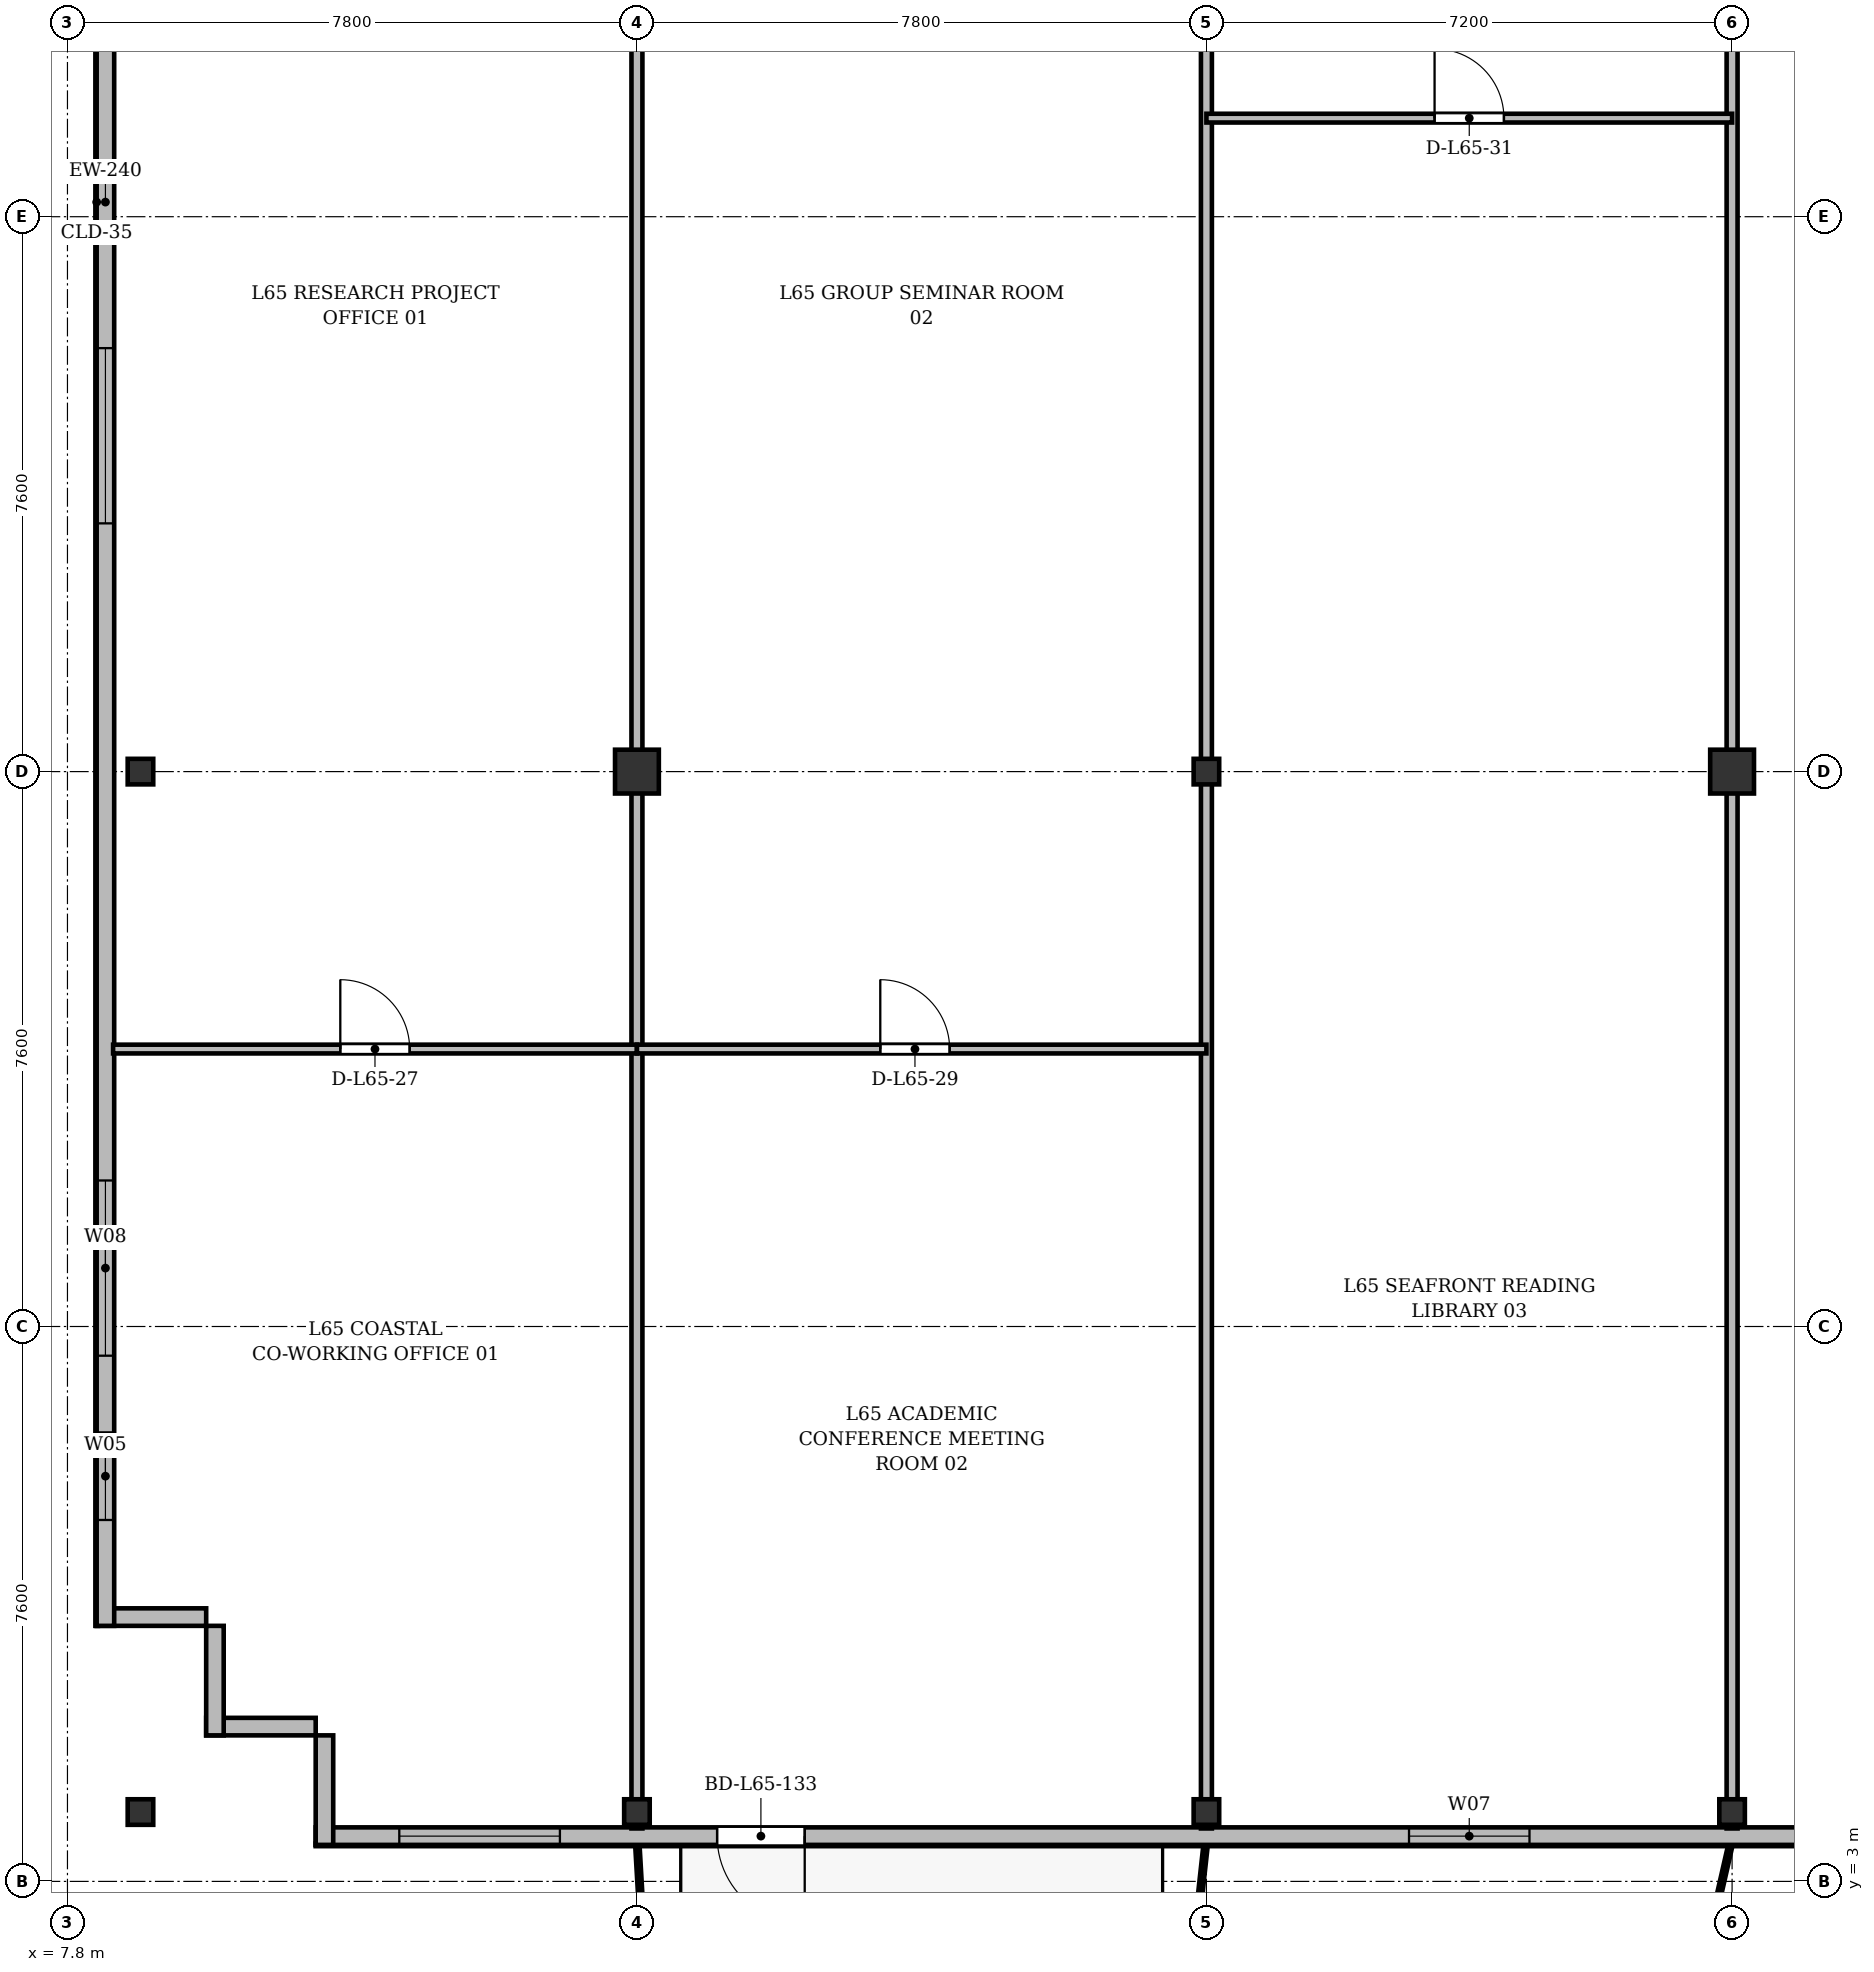
"""IFC4 building model, lengths in metres.
Left out: names, types, materials, properties, quantities, classifications, styles, units other than length and angle.
Written with IfcOpenShell. Run it as: python <this file> out.ifc"""

import sys

from ifc_helpers import new_model, si_unit, direction, frame, frame_2d, origin, origin_2d, place, context, subcontext, project, spatial, rectangle, i_section, extrude, source, transform, mapped, element, fill, save


model = new_model("IFC4")
c1 = context("Model", 3, precision=1e-05, world=origin(), true_north=direction((0.0, 1.0)))
c2 = subcontext(c1, "Body", "Model", "MODEL_VIEW")
j1 = project(units=[si_unit("LENGTHUNIT", "METRE"), si_unit("PLANEANGLEUNIT", "RADIAN")], contexts=[c1])
p1 = place(None, origin())
s1 = spatial("IfcSite", under=j1, at=p1, CompositionType="ELEMENT")
p2 = place(p1, origin())
s2 = spatial("IfcBuilding", under=s1, at=p2, CompositionType="ELEMENT")
p3 = place(p2, frame((0.0, 0.0, 252.3)))
s3 = spatial("IfcBuildingStorey", under=s2, at=p3, CompositionType="ELEMENT", Elevation=252.3)
m1 = source(origin(), c2, "Body", "SweptSolid", [
    extrude(i_section(OverallWidth=0.35, OverallDepth=0.35, WebThickness=0.018, FlangeThickness=0.028, at=origin_2d()), origin(), (0.0, 0.0, 1.0), 3.6),
])
for number, where, z_axis, x_axis in (
    (1, (8.8, 3.95, 0.0), (0.0, 0.0, 1.0), (1.0, 0.0, 0.0)),
    (2, (8.8, 18.2, 0.0), (0.0, 0.0, 1.0), (1.0, 0.0, 0.0)),
    (3, (15.6, 3.95, 0.0), (0.0, 0.0, 1.0), (1.0, 0.0, 0.0)),
):
    element("IfcColumn", number, at=place(p3, frame(where, z_axis=z_axis, x_axis=x_axis)), inside=s3, PredefinedType="COLUMN", context=c2, shape_type="MappedRepresentation", body=[
        mapped(m1, transform((0.0, 0.0, 0.0), x_axis=(1.0, 0.0, 0.0), y_axis=(0.0, 1.0, 0.0), z_axis=(0.0, 0.0, 1.0), scale=1.0)),
    ])
m2 = source(origin(), c2, "Body", "SweptSolid", [
    extrude(rectangle(XDim=0.6, YDim=0.6, at=origin_2d()), origin(), (0.0, 0.0, 1.0), 3.6),
])
p4 = place(p3, frame((15.6, 18.2, 0.0), z_axis=(0.0, 0.0, 1.0), x_axis=(1.0, 0.0, 0.0)))
e4 = element("IfcColumn", 4, at=p4, inside=s3, PredefinedType="COLUMN", context=c2, shape_type="MappedRepresentation", body=[
    mapped(m2, transform((0.0, 0.0, 0.0), x_axis=(1.0, 0.0, 0.0), y_axis=(0.0, 1.0, 0.0), z_axis=(0.0, 0.0, 1.0), scale=1.0)),
])
for number, where, z_axis, x_axis in (
    (5, (23.4, 3.95, 0.0), (0.0, 0.0, 1.0), (1.0, 0.0, 0.0)),
    (6, (23.4, 18.2, 0.0), (0.0, 0.0, 1.0), (1.0, 0.0, 0.0)),
    (7, (30.6, 3.95, 0.0), (0.0, 0.0, 1.0), (1.0, 0.0, 0.0)),
):
    element("IfcColumn", number, at=place(p3, frame(where, z_axis=z_axis, x_axis=x_axis)), inside=s3, PredefinedType="COLUMN", context=c2, shape_type="MappedRepresentation", body=[
        mapped(m1, transform((0.0, 0.0, 0.0), x_axis=(1.0, 0.0, 0.0), y_axis=(0.0, 1.0, 0.0), z_axis=(0.0, 0.0, 1.0), scale=1.0)),
    ])
p5 = place(p3, frame((30.6, 18.2, 0.0), z_axis=(0.0, 0.0, 1.0), x_axis=(1.0, 0.0, 0.0)))
e8 = element("IfcColumn", 8, at=p5, inside=s3, PredefinedType="COLUMN", context=c2, shape_type="MappedRepresentation", body=[
    mapped(m2, transform((0.0, 0.0, 0.0), x_axis=(1.0, 0.0, 0.0), y_axis=(0.0, 1.0, 0.0), z_axis=(0.0, 0.0, 1.0), scale=1.0)),
])
for number, where, z_axis, x_axis in (
    (9, (11.2, 5.12, 0.0), (0.0, 0.0, 1.0), (-1.0, 0.0, 0.0)),
    (10, (9.82, 5.0, 0.0), (0.0, 0.0, 1.0), (0.0, 1.0, 0.0)),
):
    element("IfcWall", number, at=place(p3, frame(where, z_axis=z_axis, x_axis=x_axis)), inside=s3, PredefinedType="SOLIDWALL", context=c2, shape_type="SweptSolid", body=[
        extrude(rectangle(XDim=1.5, YDim=0.24, at=frame_2d((0.75, 0.0))), origin(), (0.0, 0.0, 1.0), 3.37),
    ])
p6 = place(p3, frame((9.7, 6.62, 0.0), z_axis=(0.0, 0.0, 1.0), x_axis=(-1.0, 0.0, 0.0)))
e11 = element("IfcWall", 11, at=p6, inside=s3, PredefinedType="SOLIDWALL", context=c2, shape_type="SweptSolid", body=[
    extrude(rectangle(XDim=1.5, YDim=0.24, at=frame_2d((0.75, 0.0))), origin(), (0.0, 0.0, 1.0), 2.87),
])
p7 = place(p3, frame((8.32, 6.5, 0.0), z_axis=(0.0, 0.0, 1.0), x_axis=(0.0, 1.0, 0.0)))
e12 = element("IfcWall", 12, at=p7, inside=s3, PredefinedType="SOLIDWALL", context=c2, shape_type="SweptSolid", body=[
    extrude(rectangle(XDim=39.0, YDim=0.24, at=frame_2d((19.5, 0.0))), origin(), (0.0, 0.0, 1.0), 3.37),
])
p8 = place(p7, frame((1.45, 0.0, 0.92)))
e13 = element("IfcOpeningElement", 13, at=p8, cuts=e12, PredefinedType="OPENING", context=c2, shape_type="SweptSolid", body=[
    extrude(rectangle(XDim=1.2, YDim=1.65, at=frame_2d((0.6, 0.825))), frame((0.0, 0.13, 0.0), z_axis=(0.0, -1.0, 0.0), x_axis=(1.0, 0.0, 0.0)), (0.0, 0.0, 1.0), 0.26),
])
p9 = place(p7, frame((3.7, 0.0, 0.92)))
e14 = element("IfcOpeningElement", 14, at=p9, cuts=e12, PredefinedType="OPENING", context=c2, shape_type="SweptSolid", body=[
    extrude(rectangle(XDim=2.4, YDim=2.1, at=frame_2d((1.2, 1.05))), frame((0.0, 0.13, 0.0), z_axis=(0.0, -1.0, 0.0), x_axis=(1.0, 0.0, 0.0)), (0.0, 0.0, 1.0), 0.26),
])
p10 = place(p7, frame((15.1, 0.0, 0.92)))
e15 = element("IfcOpeningElement", 15, at=p10, cuts=e12, PredefinedType="OPENING", context=c2, shape_type="SweptSolid", body=[
    extrude(rectangle(XDim=2.4, YDim=2.1, at=frame_2d((1.2, 1.05))), frame((0.0, 0.13, 0.0), z_axis=(0.0, -1.0, 0.0), x_axis=(1.0, 0.0, 0.0)), (0.0, 0.0, 1.0), 0.26),
])
p11 = place(p7, frame((29.1, 0.0, 0.92)))
e16 = element("IfcOpeningElement", 16, at=p11, cuts=e12, PredefinedType="OPENING", context=c2, shape_type="SweptSolid", body=[
    extrude(rectangle(XDim=2.4, YDim=2.1, at=frame_2d((1.2, 1.05))), frame((0.0, 0.13, 0.0), z_axis=(0.0, -1.0, 0.0), x_axis=(1.0, 0.0, 0.0)), (0.0, 0.0, 1.0), 0.26),
])
p12 = place(p7, frame((33.3, 0.0, 0.92)))
e17 = element("IfcOpeningElement", 17, at=p12, cuts=e12, PredefinedType="OPENING", context=c2, shape_type="SweptSolid", body=[
    extrude(rectangle(XDim=1.2, YDim=1.65, at=frame_2d((0.6, 0.825))), frame((0.0, 0.13, 0.0), z_axis=(0.0, -1.0, 0.0), x_axis=(1.0, 0.0, 0.0)), (0.0, 0.0, 1.0), 0.26),
])
p13 = place(p7, frame((36.65, 0.0, 0.92)))
e18 = element("IfcOpeningElement", 18, at=p13, cuts=e12, PredefinedType="OPENING", context=c2, shape_type="SweptSolid", body=[
    extrude(rectangle(XDim=1.2, YDim=1.65, at=frame_2d((0.6, 0.825))), frame((0.0, 0.13, 0.0), z_axis=(0.0, -1.0, 0.0), x_axis=(1.0, 0.0, 0.0)), (0.0, 0.0, 1.0), 0.26),
])
p14 = place(p3, frame((63.2, 3.62, 0.0), z_axis=(0.0, 0.0, 1.0), x_axis=(-1.0, 0.0, 0.0)))
e19 = element("IfcWall", 19, at=p14, inside=s3, PredefinedType="SOLIDWALL", context=c2, shape_type="SweptSolid", body=[
    extrude(rectangle(XDim=52.0, YDim=0.24, at=frame_2d((26.0, 0.0))), origin(), (0.0, 0.0, 1.0), 3.37),
])
p15 = place(p14, frame((1.345, 0.0, 0.9)))
e20 = element("IfcOpeningElement", 20, at=p15, cuts=e19, PredefinedType="OPENING", context=c2, shape_type="SweptSolid", body=[
    extrude(rectangle(XDim=1.8, YDim=1.8, at=frame_2d((0.9, 0.9))), frame((0.0, 0.13, 0.0), z_axis=(0.0, -1.0, 0.0), x_axis=(1.0, 0.0, 0.0)), (0.0, 0.0, 1.0), 0.26),
])
p16 = place(p14, frame((7.2, 0.0, 0.9)))
e21 = element("IfcOpeningElement", 21, at=p16, cuts=e19, PredefinedType="OPENING", context=c2, shape_type="SweptSolid", body=[
    extrude(rectangle(XDim=2.2, YDim=1.8, at=frame_2d((1.1, 0.9))), frame((0.0, 0.13, 0.0), z_axis=(0.0, -1.0, 0.0), x_axis=(1.0, 0.0, 0.0)), (0.0, 0.0, 1.0), 0.26),
])
p17 = place(p14, frame((14.017, 0.0, 0.0)))
e22 = element("IfcOpeningElement", 22, at=p17, cuts=e19, PredefinedType="OPENING", context=c2, shape_type="SweptSolid", body=[
    extrude(rectangle(XDim=1.2, YDim=2.2, at=frame_2d((0.6, 1.1))), frame((0.0, 0.13, 0.0), z_axis=(0.0, -1.0, 0.0), x_axis=(1.0, 0.0, 0.0)), (0.0, 0.0, 1.0), 0.26),
])
p18 = place(p14, frame((25.0, 0.0, 0.9)))
e23 = element("IfcOpeningElement", 23, at=p18, cuts=e19, PredefinedType="OPENING", context=c2, shape_type="SweptSolid", body=[
    extrude(rectangle(XDim=2.0, YDim=1.95, at=frame_2d((1.0, 0.975))), frame((0.0, 0.13, 0.0), z_axis=(0.0, -1.0, 0.0), x_axis=(1.0, 0.0, 0.0)), (0.0, 0.0, 1.0), 0.26),
])
p19 = place(p14, frame((35.375, 0.0, 0.9)))
e24 = element("IfcOpeningElement", 24, at=p19, cuts=e19, PredefinedType="OPENING", context=c2, shape_type="SweptSolid", body=[
    extrude(rectangle(XDim=1.65, YDim=1.85, at=frame_2d((0.825, 0.925))), frame((0.0, 0.13, 0.0), z_axis=(0.0, -1.0, 0.0), x_axis=(1.0, 0.0, 0.0)), (0.0, 0.0, 1.0), 0.26),
])
p20 = place(p14, frame((45.302, 0.0, 0.0)))
e25 = element("IfcOpeningElement", 25, at=p20, cuts=e19, PredefinedType="OPENING", context=c2, shape_type="SweptSolid", body=[
    extrude(rectangle(XDim=1.2, YDim=2.2, at=frame_2d((0.6, 1.1))), frame((0.0, 0.13, 0.0), z_axis=(0.0, -1.0, 0.0), x_axis=(1.0, 0.0, 0.0)), (0.0, 0.0, 1.0), 0.26),
])
p21 = place(p14, frame((48.655, 0.0, 0.9)))
e26 = element("IfcOpeningElement", 26, at=p21, cuts=e19, PredefinedType="OPENING", context=c2, shape_type="SweptSolid", body=[
    extrude(rectangle(XDim=2.2, YDim=1.8, at=frame_2d((1.1, 0.9))), frame((0.0, 0.13, 0.0), z_axis=(0.0, -1.0, 0.0), x_axis=(1.0, 0.0, 0.0)), (0.0, 0.0, 1.0), 0.26),
])
p22 = place(p3, frame((11.32, 3.5, 0.0), z_axis=(0.0, 0.0, 1.0), x_axis=(0.0, 1.0, 0.0)))
e27 = element("IfcWall", 27, at=p22, inside=s3, PredefinedType="SOLIDWALL", context=c2, shape_type="SweptSolid", body=[
    extrude(rectangle(XDim=1.5, YDim=0.24, at=frame_2d((0.75, 0.0))), origin(), (0.0, 0.0, 1.0), 2.92),
])
for number, where, z_axis, x_axis in (
    (28, (15.6, 3.725, 0.0), (0.0, 0.0, 1.0), (0.0, 1.0, 0.0)),
    (29, (23.4, 3.725, 0.0), (0.0, 0.0, 1.0), (0.0, 1.0, 0.0)),
    (30, (30.6, 3.725, 0.0), (0.0, 0.0, 1.0), (0.0, 1.0, 0.0)),
):
    element("IfcWall", number, at=place(p3, frame(where, z_axis=z_axis, x_axis=x_axis)), inside=s3, PredefinedType="PARTITIONING", context=c2, shape_type="SweptSolid", body=[
        extrude(rectangle(XDim=27.275, YDim=0.15, at=frame_2d((13.637, 0.0))), origin(), (0.0, 0.0, 1.0), 2.87),
    ])
p23 = place(p3, frame((8.425, 14.4, 0.0), z_axis=(0.0, 0.0, 1.0), x_axis=(1.0, 0.0, 0.0)))
e31 = element("IfcWall", 31, at=p23, inside=s3, PredefinedType="PARTITIONING", context=c2, shape_type="SweptSolid", body=[
    extrude(rectangle(XDim=7.175, YDim=0.12, at=frame_2d((3.587, 0.0))), origin(), (0.0, 0.0, 1.0), 2.87),
])
p24 = place(p23, frame((3.112, 0.0, 0.0)))
e32 = element("IfcOpeningElement", 32, at=p24, cuts=e31, PredefinedType="OPENING", context=c2, shape_type="SweptSolid", body=[
    extrude(rectangle(XDim=0.95, YDim=2.15, at=frame_2d((0.475, 1.075))), frame((0.0, 0.07, 0.0), z_axis=(0.0, -1.0, 0.0), x_axis=(1.0, 0.0, 0.0)), (0.0, 0.0, 1.0), 0.14),
])
p25 = place(p3, frame((15.6, 14.4, 0.0), z_axis=(0.0, 0.0, 1.0), x_axis=(1.0, 0.0, 0.0)))
e33 = element("IfcWall", 33, at=p25, inside=s3, PredefinedType="PARTITIONING", context=c2, shape_type="SweptSolid", body=[
    extrude(rectangle(XDim=7.8, YDim=0.12, at=frame_2d((3.9, 0.0))), origin(), (0.0, 0.0, 1.0), 2.87),
])
p26 = place(p25, frame((3.333, 0.0, 0.0)))
e34 = element("IfcOpeningElement", 34, at=p26, cuts=e33, PredefinedType="OPENING", context=c2, shape_type="SweptSolid", body=[
    extrude(rectangle(XDim=0.95, YDim=2.15, at=frame_2d((0.475, 1.075))), frame((0.0, 0.07, 0.0), z_axis=(0.0, -1.0, 0.0), x_axis=(1.0, 0.0, 0.0)), (0.0, 0.0, 1.0), 0.14),
])
p27 = place(p3, frame((23.4, 27.15, 0.0), z_axis=(0.0, 0.0, 1.0), x_axis=(1.0, 0.0, 0.0)))
e35 = element("IfcWall", 35, at=p27, inside=s3, PredefinedType="PARTITIONING", context=c2, shape_type="SweptSolid", body=[
    extrude(rectangle(XDim=7.2, YDim=0.12, at=frame_2d((3.6, 0.0))), origin(), (0.0, 0.0, 1.0), 2.87),
])
p28 = place(p27, frame((3.125, 0.0, 0.0)))
e36 = element("IfcOpeningElement", 36, at=p28, cuts=e35, PredefinedType="OPENING", context=c2, shape_type="SweptSolid", body=[
    extrude(rectangle(XDim=0.95, YDim=2.15, at=frame_2d((0.475, 1.075))), frame((0.0, 0.07, 0.0), z_axis=(0.0, -1.0, 0.0), x_axis=(1.0, 0.0, 0.0)), (0.0, 0.0, 1.0), 0.14),
])
m3 = source(origin(), c2, "Body", "SweptSolid", [
    extrude(rectangle(XDim=1.2, YDim=1.65, at=frame_2d((0.6, 0.825))), frame((0.0, 0.03, 0.0), z_axis=(0.0, -1.0, 0.0), x_axis=(1.0, 0.0, 0.0)), (0.0, 0.0, 1.0), 0.06),
])
p29 = place(p8, origin())
e37 = element("IfcWindow", 37, at=p29, inside=s3, PartitioningType="SINGLE_PANEL", PredefinedType="WINDOW", context=c2, shape_type="MappedRepresentation", body=[
    mapped(m3, transform((0.0, 0.0, 0.0), x_axis=(1.0, 0.0, 0.0), y_axis=(0.0, 1.0, 0.0), z_axis=(0.0, 0.0, 1.0), scale=1.0)),
])
fill(e13, e37)
m4 = source(origin(), c2, "Body", "SweptSolid", [
    extrude(rectangle(XDim=2.4, YDim=2.1, at=frame_2d((1.2, 1.05))), frame((0.0, 0.03, 0.0), z_axis=(0.0, -1.0, 0.0), x_axis=(1.0, 0.0, 0.0)), (0.0, 0.0, 1.0), 0.06),
])
p30 = place(p9, origin())
e38 = element("IfcWindow", 38, at=p30, inside=s3, PartitioningType="SINGLE_PANEL", PredefinedType="WINDOW", context=c2, shape_type="MappedRepresentation", body=[
    mapped(m4, transform((0.0, 0.0, 0.0), x_axis=(1.0, 0.0, 0.0), y_axis=(0.0, 1.0, 0.0), z_axis=(0.0, 0.0, 1.0), scale=1.0)),
])
fill(e14, e38)
p31 = place(p10, origin())
e39 = element("IfcWindow", 39, at=p31, inside=s3, PartitioningType="SINGLE_PANEL", PredefinedType="WINDOW", context=c2, shape_type="MappedRepresentation", body=[
    mapped(m4, transform((0.0, 0.0, 0.0), x_axis=(1.0, 0.0, 0.0), y_axis=(0.0, 1.0, 0.0), z_axis=(0.0, 0.0, 1.0), scale=1.0)),
])
fill(e15, e39)
m5 = source(origin(), c2, "Body", "SweptSolid", [
    extrude(rectangle(XDim=1.65, YDim=1.85, at=frame_2d((0.825, 0.925))), frame((0.0, 0.03, 0.0), z_axis=(0.0, -1.0, 0.0), x_axis=(1.0, 0.0, 0.0)), (0.0, 0.0, 1.0), 0.06),
])
p32 = place(p19, origin())
e40 = element("IfcWindow", 40, at=p32, inside=s3, PartitioningType="SINGLE_PANEL", PredefinedType="WINDOW", context=c2, shape_type="MappedRepresentation", body=[
    mapped(m5, transform((0.0, 0.0, 0.0), x_axis=(1.0, 0.0, 0.0), y_axis=(0.0, 1.0, 0.0), z_axis=(0.0, 0.0, 1.0), scale=1.0)),
])
fill(e24, e40)
m6 = source(origin(), c2, "Body", "SweptSolid", [
    extrude(rectangle(XDim=1.2, YDim=2.2, at=frame_2d((0.6, 1.1))), frame((0.0, 0.025, 0.0), z_axis=(0.0, -1.0, 0.0), x_axis=(1.0, 0.0, 0.0)), (0.0, 0.0, 1.0), 0.05),
])
p33 = place(p20, origin())
e41 = element("IfcDoor", 41, at=p33, inside=s3, OperationType="SINGLE_SWING_LEFT", PredefinedType="DOOR", context=c2, shape_type="MappedRepresentation", body=[
    mapped(m6, transform((0.0, 0.0, 0.0), x_axis=(1.0, 0.0, 0.0), y_axis=(0.0, 1.0, 0.0), z_axis=(0.0, 0.0, 1.0), scale=1.0)),
])
fill(e25, e41)
m7 = source(origin(), c2, "Body", "SweptSolid", [
    extrude(rectangle(XDim=2.2, YDim=1.8, at=frame_2d((1.1, 0.9))), frame((0.0, 0.03, 0.0), z_axis=(0.0, -1.0, 0.0), x_axis=(1.0, 0.0, 0.0)), (0.0, 0.0, 1.0), 0.06),
])
p34 = place(p21, origin())
e42 = element("IfcWindow", 42, at=p34, inside=s3, PartitioningType="SINGLE_PANEL", PredefinedType="WINDOW", context=c2, shape_type="MappedRepresentation", body=[
    mapped(m7, transform((0.0, 0.0, 0.0), x_axis=(1.0, 0.0, 0.0), y_axis=(0.0, 1.0, 0.0), z_axis=(0.0, 0.0, 1.0), scale=1.0)),
])
fill(e26, e42)
m8 = source(origin(), c2, "Body", "SweptSolid", [
    extrude(rectangle(XDim=0.95, YDim=2.15, at=frame_2d((0.475, 1.075))), frame((0.0, 0.025, 0.0), z_axis=(0.0, -1.0, 0.0), x_axis=(1.0, 0.0, 0.0)), (0.0, 0.0, 1.0), 0.05),
])
p35 = place(p24, origin())
e43 = element("IfcDoor", 43, at=p35, inside=s3, OperationType="SINGLE_SWING_LEFT", PredefinedType="DOOR", context=c2, shape_type="MappedRepresentation", body=[
    mapped(m8, transform((0.0, 0.0, 0.0), x_axis=(1.0, 0.0, 0.0), y_axis=(0.0, 1.0, 0.0), z_axis=(0.0, 0.0, 1.0), scale=1.0)),
])
fill(e32, e43)
p36 = place(p26, origin())
e44 = element("IfcDoor", 44, at=p36, inside=s3, OperationType="SINGLE_SWING_LEFT", PredefinedType="DOOR", context=c2, shape_type="MappedRepresentation", body=[
    mapped(m8, transform((0.0, 0.0, 0.0), x_axis=(1.0, 0.0, 0.0), y_axis=(0.0, 1.0, 0.0), z_axis=(0.0, 0.0, 1.0), scale=1.0)),
])
fill(e34, e44)
p37 = place(p28, origin())
e45 = element("IfcDoor", 45, at=p37, inside=s3, OperationType="SINGLE_SWING_LEFT", PredefinedType="DOOR", context=c2, shape_type="MappedRepresentation", body=[
    mapped(m8, transform((0.0, 0.0, 0.0), x_axis=(1.0, 0.0, 0.0), y_axis=(0.0, 1.0, 0.0), z_axis=(0.0, 0.0, 1.0), scale=1.0)),
])
fill(e36, e45)
save(model, sys.argv[1])
